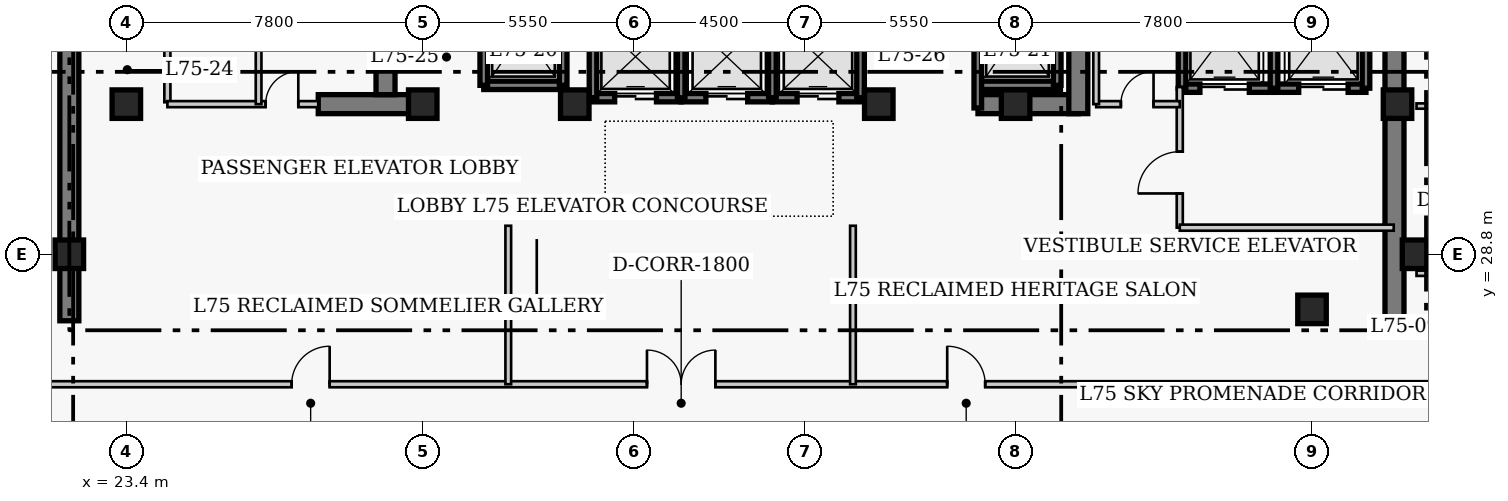
"""IFC4 building model, lengths in metres.
Left out: names, types, materials, properties, quantities, classifications, styles, units other than length and angle.
Written with IfcOpenShell. Run it as: python <this file> out.ifc"""

import sys

from ifc_helpers import new_model, si_unit, direction, frame, frame_2d, origin, origin_2d, place, context, subcontext, project, spatial, rectangle, extrude, element, fill, save


model = new_model("IFC4")
c1 = context("Model", 3, precision=1e-05, world=origin(), true_north=direction((0.0, 1.0)))
c2 = subcontext(c1, "Body", "Model", "MODEL_VIEW")
j1 = project(units=[si_unit("LENGTHUNIT", "METRE"), si_unit("PLANEANGLEUNIT", "RADIAN")], contexts=[c1])
p1 = place(None, origin())
s1 = spatial("IfcSite", under=j1, at=p1, CompositionType="ELEMENT")
p2 = place(p1, origin())
s2 = spatial("IfcBuilding", under=s1, at=p2, CompositionType="ELEMENT")
p3 = place(p2, frame((0.0, 0.0, 302.0)))
s3 = spatial("IfcBuildingStorey", under=s2, at=p3, CompositionType="ELEMENT", Elevation=302.0)
for number, where, z_axis, x_axis in (
    (1, (21.9, 27.05, 0.0), (0.0, 0.0, 1.0), (0.0, 1.0, 0.0)),
    (2, (56.77, 27.05, 0.0), (0.0, 0.0, 1.0), (0.0, 1.0, 0.0)),
):
    element("IfcWall", number, at=place(p3, frame(where, z_axis=z_axis, x_axis=x_axis)), inside=s3, PredefinedType="SHEAR", context=c2, shape_type="SweptSolid", body=[
        extrude(rectangle(XDim=13.52, YDim=0.5, at=frame_2d((6.76, 0.0))), origin(), (0.0, 0.0, 1.0), 4.6),
    ])
p4 = place(p3, frame((28.45, 32.75, 0.0), z_axis=(0.0, 0.0, 1.0), x_axis=(1.0, 0.0, 0.0)))
e3 = element("IfcWall", 3, at=p4, inside=s3, PredefinedType="SHEAR", context=c2, shape_type="SweptSolid", body=[
    extrude(rectangle(XDim=2.4, YDim=0.5, at=frame_2d((1.2, 0.0))), origin(), (0.0, 0.0, 1.0), 4.6),
])
p5 = place(p3, frame((45.81, 32.75, 0.0), z_axis=(0.0, 0.0, 1.0), x_axis=(1.0, 0.0, 0.0)))
e4 = element("IfcWall", 4, at=p5, inside=s3, PredefinedType="SHEAR", context=c2, shape_type="SweptSolid", body=[
    extrude(rectangle(XDim=2.64, YDim=0.5, at=frame_2d((1.32, 0.0))), origin(), (0.0, 0.0, 1.0), 4.6),
])
p6 = place(p3, frame((30.22, 33.0, 0.0), z_axis=(0.0, 0.0, 1.0), x_axis=(0.0, 1.0, 0.0)))
e5 = element("IfcWall", 5, at=p6, inside=s3, PredefinedType="SHEAR", context=c2, shape_type="SweptSolid", body=[
    extrude(rectangle(XDim=7.32, YDim=0.5, at=frame_2d((3.66, 0.0))), origin(), (0.0, 0.0, 1.0), 4.6),
])
p7 = place(p3, frame((48.45, 32.5, 0.0), z_axis=(0.0, 0.0, 1.0), x_axis=(0.0, 1.0, 0.0)))
e6 = element("IfcWall", 6, at=p7, inside=s3, PredefinedType="SHEAR", context=c2, shape_type="SweptSolid", body=[
    extrude(rectangle(XDim=7.82, YDim=0.5, at=frame_2d((3.91, 0.0))), origin(), (0.0, 0.0, 1.0), 4.6),
])
p8 = place(p7, frame((5.7, 0.0, 0.0)))
e7 = element("IfcOpeningElement", 7, at=p8, cuts=e6, PredefinedType="OPENING", context=c2, shape_type="SweptSolid", body=[
    extrude(rectangle(XDim=1.1, YDim=2.15, at=frame_2d((0.55, 1.075))), frame((0.0, 0.26, 0.0), z_axis=(0.0, -1.0, 0.0), x_axis=(1.0, 0.0, 0.0)), (0.0, 0.0, 1.0), 0.52),
])
for number, where, z_axis, x_axis in (
    (8, (21.9, 28.8, 0.0), (0.0, 0.0, 1.0), (1.0, 0.0, 0.0)),
    (9, (57.35, 28.8, 0.0), (0.0, 0.0, 1.0), (1.0, 0.0, 0.0)),
    (10, (23.4, 32.75, 0.0), (0.0, 0.0, 1.0), (1.0, 0.0, 0.0)),
    (11, (31.2, 32.75, 0.0), (0.0, 0.0, 1.0), (1.0, 0.0, 0.0)),
    (12, (35.2, 32.75, 0.0), (0.0, 0.0, 1.0), (1.0, 0.0, 0.0)),
    (13, (43.2, 32.75, 0.0), (0.0, 0.0, 1.0), (1.0, 0.0, 0.0)),
    (14, (46.8, 32.75, 0.0), (0.0, 0.0, 1.0), (1.0, 0.0, 0.0)),
    (15, (54.6, 27.35, 0.0), (0.0, 0.0, 1.0), (1.0, 0.0, 0.0)),
    (16, (56.85, 32.75, 0.0), (0.0, 0.0, 1.0), (1.0, 0.0, 0.0)),
):
    element("IfcColumn", number, at=place(p3, frame(where, z_axis=z_axis, x_axis=x_axis)), inside=s3, PredefinedType="COLUMN", context=c2, shape_type="SweptSolid", body=[
        extrude(rectangle(XDim=0.75, YDim=0.75, at=origin_2d()), origin(), (0.0, 0.0, 1.0), 4.6),
    ])
p9 = place(p3, frame((35.68, 32.92, 0.0), z_axis=(0.0, 0.0, 1.0), x_axis=(1.0, 0.0, 0.0)))
e17 = element("IfcWall", 17, at=p9, inside=s3, PredefinedType="SHEAR", context=c2, shape_type="SweptSolid", body=[
    extrude(rectangle(XDim=2.32, YDim=0.22, at=frame_2d((1.16, 0.0))), origin(), (0.0, 0.0, 1.0), 4.6),
])
p10 = place(p9, frame((0.57, 0.0, 0.0)))
e18 = element("IfcOpeningElement", 18, at=p10, cuts=e17, PredefinedType="OPENING", context=c2, shape_type="SweptSolid", body=[
    extrude(rectangle(XDim=1.1, YDim=2.15, at=frame_2d((0.55, 1.075))), frame((0.0, 0.12, 0.0), z_axis=(0.0, -1.0, 0.0), x_axis=(1.0, 0.0, 0.0)), (0.0, 0.0, 1.0), 0.24),
])
p11 = place(p3, frame((35.68, 32.92, 0.0), z_axis=(0.0, 0.0, 1.0), x_axis=(0.0, 1.0, 0.0)))
e19 = element("IfcWall", 19, at=p11, inside=s3, PredefinedType="SHEAR", context=c2, shape_type="SweptSolid", body=[
    extrude(rectangle(XDim=2.16, YDim=0.2, at=frame_2d((1.08, 0.0))), origin(), (0.0, 0.0, 1.0), 4.6),
])
p12 = place(p3, frame((38.0, 32.92, 0.0), z_axis=(0.0, 0.0, 1.0), x_axis=(1.0, 0.0, 0.0)))
e20 = element("IfcWall", 20, at=p12, inside=s3, PredefinedType="SHEAR", context=c2, shape_type="SweptSolid", body=[
    extrude(rectangle(XDim=2.4, YDim=0.22, at=frame_2d((1.2, 0.0))), origin(), (0.0, 0.0, 1.0), 4.6),
])
p13 = place(p12, frame((0.65, 0.0, 0.0)))
e21 = element("IfcOpeningElement", 21, at=p13, cuts=e20, PredefinedType="OPENING", context=c2, shape_type="SweptSolid", body=[
    extrude(rectangle(XDim=1.1, YDim=2.15, at=frame_2d((0.55, 1.075))), frame((0.0, 0.12, 0.0), z_axis=(0.0, -1.0, 0.0), x_axis=(1.0, 0.0, 0.0)), (0.0, 0.0, 1.0), 0.24),
])
p14 = place(p3, frame((38.0, 32.92, 0.0), z_axis=(0.0, 0.0, 1.0), x_axis=(0.0, 1.0, 0.0)))
e22 = element("IfcWall", 22, at=p14, inside=s3, PredefinedType="SHEAR", context=c2, shape_type="SweptSolid", body=[
    extrude(rectangle(XDim=2.16, YDim=0.2, at=frame_2d((1.08, 0.0))), origin(), (0.0, 0.0, 1.0), 4.6),
])
p15 = place(p3, frame((40.4, 32.92, 0.0), z_axis=(0.0, 0.0, 1.0), x_axis=(1.0, 0.0, 0.0)))
e23 = element("IfcWall", 23, at=p15, inside=s3, PredefinedType="SHEAR", context=c2, shape_type="SweptSolid", body=[
    extrude(rectangle(XDim=2.32, YDim=0.22, at=frame_2d((1.16, 0.0))), origin(), (0.0, 0.0, 1.0), 4.6),
])
p16 = place(p15, frame((0.65, 0.0, 0.0)))
e24 = element("IfcOpeningElement", 24, at=p16, cuts=e23, PredefinedType="OPENING", context=c2, shape_type="SweptSolid", body=[
    extrude(rectangle(XDim=1.1, YDim=2.15, at=frame_2d((0.55, 1.075))), frame((0.0, 0.12, 0.0), z_axis=(0.0, -1.0, 0.0), x_axis=(1.0, 0.0, 0.0)), (0.0, 0.0, 1.0), 0.24),
])
for number, where, z_axis, x_axis in (
    (25, (40.4, 32.92, 0.0), (0.0, 0.0, 1.0), (0.0, 1.0, 0.0)),
    (26, (42.72, 32.92, 0.0), (0.0, 0.0, 1.0), (0.0, 1.0, 0.0)),
):
    element("IfcWall", number, at=place(p3, frame(where, z_axis=z_axis, x_axis=x_axis)), inside=s3, PredefinedType="SHEAR", context=c2, shape_type="SweptSolid", body=[
        extrude(rectangle(XDim=2.16, YDim=0.2, at=frame_2d((1.08, 0.0))), origin(), (0.0, 0.0, 1.0), 4.6),
    ])
p17 = place(p3, frame((51.18, 33.17, 0.0), z_axis=(0.0, 0.0, 1.0), x_axis=(1.0, 0.0, 0.0)))
e27 = element("IfcWall", 27, at=p17, inside=s3, PredefinedType="SHEAR", context=c2, shape_type="SweptSolid", body=[
    extrude(rectangle(XDim=2.42, YDim=0.22, at=frame_2d((1.21, 0.0))), origin(), (0.0, 0.0, 1.0), 4.6),
])
p18 = place(p17, frame((0.47, 0.0, 0.0)))
e28 = element("IfcOpeningElement", 28, at=p18, cuts=e27, PredefinedType="OPENING", context=c2, shape_type="SweptSolid", body=[
    extrude(rectangle(XDim=1.3, YDim=2.15, at=frame_2d((0.65, 1.075))), frame((0.0, 0.12, 0.0), z_axis=(0.0, -1.0, 0.0), x_axis=(1.0, 0.0, 0.0)), (0.0, 0.0, 1.0), 0.24),
])
p19 = place(p3, frame((51.18, 33.17, 0.0), z_axis=(0.0, 0.0, 1.0), x_axis=(0.0, 1.0, 0.0)))
e29 = element("IfcWall", 29, at=p19, inside=s3, PredefinedType="SHEAR", context=c2, shape_type="SweptSolid", body=[
    extrude(rectangle(XDim=2.86, YDim=0.2, at=frame_2d((1.43, 0.0))), origin(), (0.0, 0.0, 1.0), 4.6),
])
p20 = place(p3, frame((53.6, 33.17, 0.0), z_axis=(0.0, 0.0, 1.0), x_axis=(1.0, 0.0, 0.0)))
e30 = element("IfcWall", 30, at=p20, inside=s3, PredefinedType="SHEAR", context=c2, shape_type="SweptSolid", body=[
    extrude(rectangle(XDim=2.42, YDim=0.22, at=frame_2d((1.21, 0.0))), origin(), (0.0, 0.0, 1.0), 4.6),
])
p21 = place(p20, frame((0.65, 0.0, 0.0)))
e31 = element("IfcOpeningElement", 31, at=p21, cuts=e30, PredefinedType="OPENING", context=c2, shape_type="SweptSolid", body=[
    extrude(rectangle(XDim=1.3, YDim=2.15, at=frame_2d((0.65, 1.075))), frame((0.0, 0.12, 0.0), z_axis=(0.0, -1.0, 0.0), x_axis=(1.0, 0.0, 0.0)), (0.0, 0.0, 1.0), 0.24),
])
for number, where, z_axis, x_axis in (
    (32, (53.6, 33.17, 0.0), (0.0, 0.0, 1.0), (0.0, 1.0, 0.0)),
    (33, (56.02, 33.17, 0.0), (0.0, 0.0, 1.0), (0.0, 1.0, 0.0)),
):
    element("IfcWall", number, at=place(p3, frame(where, z_axis=z_axis, x_axis=x_axis)), inside=s3, PredefinedType="SHEAR", context=c2, shape_type="SweptSolid", body=[
        extrude(rectangle(XDim=2.86, YDim=0.2, at=frame_2d((1.43, 0.0))), origin(), (0.0, 0.0, 1.0), 4.6),
    ])
p22 = place(p3, frame((32.805, 33.245, 0.0), z_axis=(0.0, 0.0, 1.0), x_axis=(1.0, 0.0, 0.0)))
e34 = element("IfcWall", 34, at=p22, inside=s3, PredefinedType="SHEAR", context=c2, shape_type="SweptSolid", body=[
    extrude(rectangle(XDim=2.09, YDim=0.22, at=frame_2d((1.045, 0.0))), origin(), (0.0, 0.0, 1.0), 4.6),
])
for number, where, z_axis, x_axis in (
    (35, (32.805, 33.245, 0.0), (0.0, 0.0, 1.0), (0.0, 1.0, 0.0)),
    (36, (34.895, 33.245, 0.0), (0.0, 0.0, 1.0), (0.0, 1.0, 0.0)),
):
    element("IfcWall", number, at=place(p3, frame(where, z_axis=z_axis, x_axis=x_axis)), inside=s3, PredefinedType="SHEAR", context=c2, shape_type="SweptSolid", body=[
        extrude(rectangle(XDim=2.91, YDim=0.2, at=frame_2d((1.455, 0.0))), origin(), (0.0, 0.0, 1.0), 4.6),
    ])
p23 = place(p3, frame((45.805, 33.245, 0.0), z_axis=(0.0, 0.0, 1.0), x_axis=(1.0, 0.0, 0.0)))
e37 = element("IfcWall", 37, at=p23, inside=s3, PredefinedType="SHEAR", context=c2, shape_type="SweptSolid", body=[
    extrude(rectangle(XDim=2.09, YDim=0.22, at=frame_2d((1.045, 0.0))), origin(), (0.0, 0.0, 1.0), 4.6),
])
p24 = place(p3, frame((45.805, 32.65, 0.0), z_axis=(0.0, 0.0, 1.0), x_axis=(0.0, 1.0, 0.0)))
e38 = element("IfcWall", 38, at=p24, inside=s3, PredefinedType="SHEAR", context=c2, shape_type="SweptSolid", body=[
    extrude(rectangle(XDim=3.505, YDim=0.2, at=frame_2d((1.752, 0.0))), origin(), (0.0, 0.0, 1.0), 4.6),
])
p25 = place(p3, frame((47.895, 33.245, 0.0), z_axis=(0.0, 0.0, 1.0), x_axis=(0.0, 1.0, 0.0)))
e39 = element("IfcWall", 39, at=p25, inside=s3, PredefinedType="SHEAR", context=c2, shape_type="SweptSolid", body=[
    extrude(rectangle(XDim=2.91, YDim=0.2, at=frame_2d((1.455, 0.0))), origin(), (0.0, 0.0, 1.0), 4.6),
])
p26 = place(p3, frame((24.48, 32.8, 0.0), z_axis=(0.0, 0.0, 1.0), x_axis=(0.0, 1.0, 0.0)))
e40 = element("IfcWall", 40, at=p26, inside=s3, PredefinedType="PARTITIONING", context=c2, shape_type="SweptSolid", body=[
    extrude(rectangle(XDim=3.57, YDim=0.16, at=frame_2d((1.785, 0.0))), origin(), (0.0, 0.0, 1.0), 4.31),
])
p27 = place(p26, frame((1.604, 0.0, 0.0)))
e41 = element("IfcOpeningElement", 41, at=p27, cuts=e40, PredefinedType="OPENING", context=c2, shape_type="SweptSolid", body=[
    extrude(rectangle(XDim=0.9, YDim=2.1, at=frame_2d((0.45, 1.05))), frame((0.0, 0.09, 0.0), z_axis=(0.0, -1.0, 0.0), x_axis=(1.0, 0.0, 0.0)), (0.0, 0.0, 1.0), 0.18),
])
p28 = place(p3, frame((51.12, 29.5, 0.0), z_axis=(0.0, 0.0, 1.0), x_axis=(0.0, 1.0, 0.0)))
e42 = element("IfcWall", 42, at=p28, inside=s3, PredefinedType="PARTITIONING", context=c2, shape_type="SweptSolid", body=[
    extrude(rectangle(XDim=3.7, YDim=0.16, at=frame_2d((1.85, 0.0))), origin(), (0.0, 0.0, 1.0), 4.31),
])
p29 = place(p28, frame((0.9, 0.0, 0.0)))
e43 = element("IfcOpeningElement", 43, at=p29, cuts=e42, PredefinedType="OPENING", context=c2, shape_type="SweptSolid", body=[
    extrude(rectangle(XDim=1.1, YDim=2.15, at=frame_2d((0.55, 1.075))), frame((0.0, 0.09, 0.0), z_axis=(0.0, -1.0, 0.0), x_axis=(1.0, 0.0, 0.0)), (0.0, 0.0, 1.0), 0.18),
])
p30 = place(p3, frame((51.12, 29.5, 0.0), z_axis=(0.0, 0.0, 1.0), x_axis=(1.0, 0.0, 0.0)))
e44 = element("IfcWall", 44, at=p30, inside=s3, PredefinedType="PARTITIONING", context=c2, shape_type="SweptSolid", body=[
    extrude(rectangle(XDim=5.63, YDim=0.16, at=frame_2d((2.815, 0.0))), origin(), (0.0, 0.0, 1.0), 4.31),
])
p31 = place(p3, frame((24.48, 32.75, 0.0), z_axis=(0.0, 0.0, 1.0), x_axis=(1.0, 0.0, 0.0)))
e45 = element("IfcWall", 45, at=p31, inside=s3, PredefinedType="PARTITIONING", context=c2, shape_type="SweptSolid", body=[
    extrude(rectangle(XDim=3.97, YDim=0.16, at=frame_2d((1.985, 0.0))), origin(), (0.0, 0.0, 1.0), 4.31),
])
p32 = place(p31, frame((2.585, 0.0, 0.0)))
e46 = element("IfcOpeningElement", 46, at=p32, cuts=e45, PredefinedType="OPENING", context=c2, shape_type="SweptSolid", body=[
    extrude(rectangle(XDim=0.86, YDim=2.05, at=frame_2d((0.43, 1.025))), frame((0.0, 0.09, 0.0), z_axis=(0.0, -1.0, 0.0), x_axis=(1.0, 0.0, 0.0)), (0.0, 0.0, 1.0), 0.18),
])
p33 = place(p3, frame((48.92, 32.75, 0.0), z_axis=(0.0, 0.0, 1.0), x_axis=(1.0, 0.0, 0.0)))
e47 = element("IfcWall", 47, at=p33, inside=s3, PredefinedType="PARTITIONING", context=c2, shape_type="SweptSolid", body=[
    extrude(rectangle(XDim=2.2, YDim=0.16, at=frame_2d((1.1, 0.0))), origin(), (0.0, 0.0, 1.0), 4.31),
])
p34 = place(p33, frame((0.65, 0.0, 0.0)))
e48 = element("IfcOpeningElement", 48, at=p34, cuts=e47, PredefinedType="OPENING", context=c2, shape_type="SweptSolid", body=[
    extrude(rectangle(XDim=0.86, YDim=2.05, at=frame_2d((0.43, 1.025))), frame((0.0, 0.09, 0.0), z_axis=(0.0, -1.0, 0.0), x_axis=(1.0, 0.0, 0.0)), (0.0, 0.0, 1.0), 0.18),
])
for number, where, z_axis, x_axis in (
    (49, (48.92, 32.75, 0.0), (0.0, 0.0, 1.0), (0.0, 1.0, 0.0)),
    (50, (26.88, 32.75, 0.0), (0.0, 0.0, 1.0), (0.0, 1.0, 0.0)),
):
    element("IfcWall", number, at=place(p3, frame(where, z_axis=z_axis, x_axis=x_axis)), inside=s3, PredefinedType="PARTITIONING", context=c2, shape_type="SweptSolid", body=[
        extrude(rectangle(XDim=3.62, YDim=0.15, at=frame_2d((1.81, 0.0))), origin(), (0.0, 0.0, 1.0), 4.31),
    ])
p35 = place(p3, frame((10.5, 25.38, 0.0), z_axis=(0.0, 0.0, 1.0), x_axis=(1.0, 0.0, 0.0)))
e51 = element("IfcWall", 51, at=p35, inside=s3, PredefinedType="PARTITIONING", context=c2, shape_type="SweptSolid", body=[
    extrude(rectangle(XDim=57.0, YDim=0.16, at=frame_2d((28.5, 0.0))), origin(), (0.0, 0.0, 1.0), 4.31),
])
p36 = place(p35, frame((26.6, 0.0, 0.0)))
e52 = element("IfcOpeningElement", 52, at=p36, cuts=e51, PredefinedType="OPENING", context=c2, shape_type="SweptSolid", body=[
    extrude(rectangle(XDim=1.8, YDim=2.2, at=frame_2d((0.9, 1.1))), frame((0.0, 0.09, 0.0), z_axis=(0.0, -1.0, 0.0), x_axis=(1.0, 0.0, 0.0)), (0.0, 0.0, 1.0), 0.18),
])
p37 = place(p35, frame((17.25, 0.0, 0.0)))
e53 = element("IfcOpeningElement", 53, at=p37, cuts=e51, PredefinedType="OPENING", context=c2, shape_type="SweptSolid", body=[
    extrude(rectangle(XDim=1.0, YDim=2.15, at=frame_2d((0.5, 1.075))), frame((0.0, 0.09, 0.0), z_axis=(0.0, -1.0, 0.0), x_axis=(1.0, 0.0, 0.0)), (0.0, 0.0, 1.0), 0.18),
])
p38 = place(p35, frame((34.5, 0.0, 0.0)))
e54 = element("IfcOpeningElement", 54, at=p38, cuts=e51, PredefinedType="OPENING", context=c2, shape_type="SweptSolid", body=[
    extrude(rectangle(XDim=1.0, YDim=2.15, at=frame_2d((0.5, 1.075))), frame((0.0, 0.09, 0.0), z_axis=(0.0, -1.0, 0.0), x_axis=(1.0, 0.0, 0.0)), (0.0, 0.0, 1.0), 0.18),
])
p39 = place(p35, frame((5.15, 0.0, 0.0)))
e55 = element("IfcOpeningElement", 55, at=p39, cuts=e51, PredefinedType="OPENING", context=c2, shape_type="SweptSolid", body=[
    extrude(rectangle(XDim=1.0, YDim=2.15, at=frame_2d((0.5, 1.075))), frame((0.0, 0.09, 0.0), z_axis=(0.0, -1.0, 0.0), x_axis=(1.0, 0.0, 0.0)), (0.0, 0.0, 1.0), 0.18),
])
p40 = place(p35, frame((48.11, 0.0, 0.0)))
e56 = element("IfcOpeningElement", 56, at=p40, cuts=e51, PredefinedType="OPENING", context=c2, shape_type="SweptSolid", body=[
    extrude(rectangle(XDim=0.88, YDim=2.05, at=frame_2d((0.44, 1.025))), frame((0.0, 0.09, 0.0), z_axis=(0.0, -1.0, 0.0), x_axis=(1.0, 0.0, 0.0)), (0.0, 0.0, 1.0), 0.18),
])
p41 = place(p35, frame((50.35, 0.0, 0.0)))
e57 = element("IfcOpeningElement", 57, at=p41, cuts=e51, PredefinedType="OPENING", context=c2, shape_type="SweptSolid", body=[
    extrude(rectangle(XDim=1.0, YDim=2.15, at=frame_2d((0.5, 1.075))), frame((0.0, 0.09, 0.0), z_axis=(0.0, -1.0, 0.0), x_axis=(1.0, 0.0, 0.0)), (0.0, 0.0, 1.0), 0.18),
])
for number, where, z_axis, x_axis in (
    (58, (33.45, 25.38, 0.0), (0.0, 0.0, 1.0), (0.0, 1.0, 0.0)),
    (59, (42.52, 25.38, 0.0), (0.0, 0.0, 1.0), (0.0, 1.0, 0.0)),
):
    element("IfcWall", number, at=place(p3, frame(where, z_axis=z_axis, x_axis=x_axis)), inside=s3, PredefinedType="PARTITIONING", context=c2, shape_type="SweptSolid", body=[
        extrude(rectangle(XDim=4.17, YDim=0.15, at=frame_2d((2.085, 0.0))), origin(), (0.0, 0.0, 1.0), 4.31),
    ])
p42 = place(p3, frame((57.35, 28.3, 0.0), z_axis=(0.0, 0.0, 1.0), x_axis=(1.0, 0.0, 0.0)))
e60 = element("IfcWall", 60, at=p42, inside=s3, PredefinedType="PLUMBINGWALL", context=c2, shape_type="SweptSolid", body=[
    extrude(rectangle(XDim=3.23, YDim=0.14, at=frame_2d((1.615, 0.0))), origin(), (0.0, 0.0, 1.0), 4.31),
])
p43 = place(p42, frame((1.175, 0.0, 0.0)))
e61 = element("IfcOpeningElement", 61, at=p43, cuts=e60, PredefinedType="OPENING", context=c2, shape_type="SweptSolid", body=[
    extrude(rectangle(XDim=0.88, YDim=2.05, at=frame_2d((0.44, 1.025))), frame((0.0, 0.08, 0.0), z_axis=(0.0, -1.0, 0.0), x_axis=(1.0, 0.0, 0.0)), (0.0, 0.0, 1.0), 0.16),
])
p44 = place(p3, frame((57.35, 32.7, 0.0), z_axis=(0.0, 0.0, 1.0), x_axis=(1.0, 0.0, 0.0)))
e62 = element("IfcWall", 62, at=p44, inside=s3, PredefinedType="PLUMBINGWALL", context=c2, shape_type="SweptSolid", body=[
    extrude(rectangle(XDim=3.23, YDim=0.14, at=frame_2d((1.615, 0.0))), origin(), (0.0, 0.0, 1.0), 4.31),
])
p45 = place(p10, origin())
e63 = element("IfcDoor", 63, at=p45, inside=s3, OperationType="DOUBLE_DOOR_SLIDING", PredefinedType="DOOR", context=c2, shape_type="SweptSolid", body=[
    extrude(rectangle(XDim=1.1, YDim=2.15, at=frame_2d((0.55, 1.075))), frame((0.0, 0.025, 0.0), z_axis=(0.0, -1.0, 0.0), x_axis=(1.0, 0.0, 0.0)), (0.0, 0.0, 1.0), 0.05),
])
fill(e18, e63)
p46 = place(p13, origin())
e64 = element("IfcDoor", 64, at=p46, inside=s3, OperationType="DOUBLE_DOOR_SLIDING", PredefinedType="DOOR", context=c2, shape_type="SweptSolid", body=[
    extrude(rectangle(XDim=1.1, YDim=2.15, at=frame_2d((0.55, 1.075))), frame((0.0, 0.025, 0.0), z_axis=(0.0, -1.0, 0.0), x_axis=(1.0, 0.0, 0.0)), (0.0, 0.0, 1.0), 0.05),
])
fill(e21, e64)
p47 = place(p16, origin())
e65 = element("IfcDoor", 65, at=p47, inside=s3, OperationType="DOUBLE_DOOR_SLIDING", PredefinedType="DOOR", context=c2, shape_type="SweptSolid", body=[
    extrude(rectangle(XDim=1.1, YDim=2.15, at=frame_2d((0.55, 1.075))), frame((0.0, 0.025, 0.0), z_axis=(0.0, -1.0, 0.0), x_axis=(1.0, 0.0, 0.0)), (0.0, 0.0, 1.0), 0.05),
])
fill(e24, e65)
p48 = place(p18, origin())
e66 = element("IfcDoor", 66, at=p48, inside=s3, OperationType="DOUBLE_DOOR_SLIDING", PredefinedType="DOOR", context=c2, shape_type="SweptSolid", body=[
    extrude(rectangle(XDim=1.3, YDim=2.15, at=frame_2d((0.65, 1.075))), frame((0.0, 0.025, 0.0), z_axis=(0.0, -1.0, 0.0), x_axis=(1.0, 0.0, 0.0)), (0.0, 0.0, 1.0), 0.05),
])
fill(e28, e66)
p49 = place(p21, origin())
e67 = element("IfcDoor", 67, at=p49, inside=s3, OperationType="DOUBLE_DOOR_SLIDING", PredefinedType="DOOR", context=c2, shape_type="SweptSolid", body=[
    extrude(rectangle(XDim=1.3, YDim=2.15, at=frame_2d((0.65, 1.075))), frame((0.0, 0.025, 0.0), z_axis=(0.0, -1.0, 0.0), x_axis=(1.0, 0.0, 0.0)), (0.0, 0.0, 1.0), 0.05),
])
fill(e31, e67)
p50 = place(p29, origin())
e68 = element("IfcDoor", 68, at=p50, inside=s3, OperationType="SINGLE_SWING_LEFT", PredefinedType="DOOR", context=c2, shape_type="SweptSolid", body=[
    extrude(rectangle(XDim=1.1, YDim=2.15, at=frame_2d((0.55, 1.075))), frame((0.0, 0.025, 0.0), z_axis=(0.0, -1.0, 0.0), x_axis=(1.0, 0.0, 0.0)), (0.0, 0.0, 1.0), 0.05),
])
fill(e43, e68)
p51 = place(p32, origin())
e69 = element("IfcDoor", 69, at=p51, inside=s3, OperationType="SINGLE_SWING_RIGHT", PredefinedType="DOOR", context=c2, shape_type="SweptSolid", body=[
    extrude(rectangle(XDim=0.86, YDim=2.05, at=frame_2d((0.43, 1.025))), frame((0.0, 0.025, 0.0), z_axis=(0.0, -1.0, 0.0), x_axis=(1.0, 0.0, 0.0)), (0.0, 0.0, 1.0), 0.05),
])
fill(e46, e69)
p52 = place(p34, origin())
e70 = element("IfcDoor", 70, at=p52, inside=s3, OperationType="SINGLE_SWING_RIGHT", PredefinedType="DOOR", context=c2, shape_type="SweptSolid", body=[
    extrude(rectangle(XDim=0.86, YDim=2.05, at=frame_2d((0.43, 1.025))), frame((0.0, 0.025, 0.0), z_axis=(0.0, -1.0, 0.0), x_axis=(1.0, 0.0, 0.0)), (0.0, 0.0, 1.0), 0.05),
])
fill(e48, e70)
p53 = place(p36, origin())
e71 = element("IfcDoor", 71, at=p53, inside=s3, OperationType="DOUBLE_DOOR_SINGLE_SWING", PredefinedType="DOOR", context=c2, shape_type="SweptSolid", body=[
    extrude(rectangle(XDim=1.8, YDim=2.2, at=frame_2d((0.9, 1.1))), frame((0.0, 0.025, 0.0), z_axis=(0.0, -1.0, 0.0), x_axis=(1.0, 0.0, 0.0)), (0.0, 0.0, 1.0), 0.05),
])
fill(e52, e71)
p54 = place(p37, origin())
e72 = element("IfcDoor", 72, at=p54, inside=s3, OperationType="SINGLE_SWING_RIGHT", PredefinedType="DOOR", context=c2, shape_type="SweptSolid", body=[
    extrude(rectangle(XDim=1.0, YDim=2.15, at=frame_2d((0.5, 1.075))), frame((0.0, 0.025, 0.0), z_axis=(0.0, -1.0, 0.0), x_axis=(1.0, 0.0, 0.0)), (0.0, 0.0, 1.0), 0.05),
])
fill(e53, e72)
p55 = place(p38, origin())
e73 = element("IfcDoor", 73, at=p55, inside=s3, OperationType="SINGLE_SWING_LEFT", PredefinedType="DOOR", context=c2, shape_type="SweptSolid", body=[
    extrude(rectangle(XDim=1.0, YDim=2.15, at=frame_2d((0.5, 1.075))), frame((0.0, 0.025, 0.0), z_axis=(0.0, -1.0, 0.0), x_axis=(1.0, 0.0, 0.0)), (0.0, 0.0, 1.0), 0.05),
])
fill(e54, e73)
save(model, sys.argv[1])
